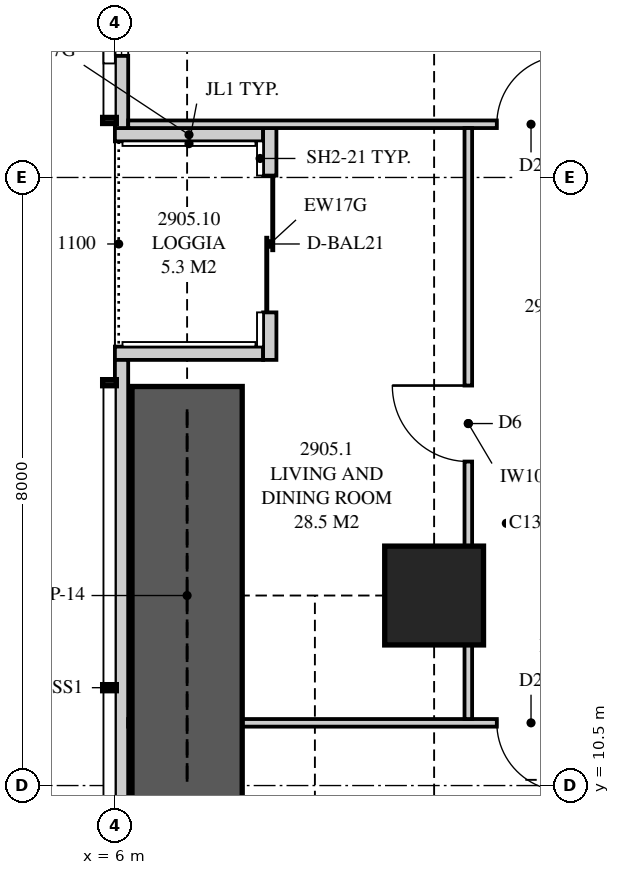
"""IFC4 building model, lengths in metres.
Left out: names, types, materials, properties, quantities, classifications, styles, units other than length and angle.
Written with IfcOpenShell. Run it as: python <this file> out.ifc"""

import sys

from ifc_helpers import new_model, si_unit, direction, frame, frame_2d, origin, origin_2d, place, context, subcontext, project, spatial, polyline, rectangle, outline, extrude, element, fill, save


model = new_model("IFC4")
c1 = context("Model", 3, precision=1e-05, world=origin(), true_north=direction((0.0, 1.0)))
c2 = subcontext(c1, "Body", "Model", "MODEL_VIEW")
j1 = project(units=[si_unit("LENGTHUNIT", "METRE"), si_unit("PLANEANGLEUNIT", "RADIAN")], contexts=[c1])
p1 = place(None, origin())
s1 = spatial("IfcSite", under=j1, at=p1, CompositionType="ELEMENT")
p2 = place(p1, origin())
s2 = spatial("IfcBuilding", under=s1, at=p2, CompositionType="ELEMENT")
p3 = place(p2, frame((0.0, 0.0, 108.2)))
s3 = spatial("IfcBuildingStorey", under=s2, at=p3, CompositionType="ELEMENT", Elevation=108.2)
p4 = place(p3, frame((10.2, 13.0, 0.0), z_axis=(0.0, 0.0, 1.0), x_axis=(1.0, 0.0, 0.0)))
e1 = element("IfcColumn", 1, at=p4, inside=s3, PredefinedType="COLUMN", context=c2, shape_type="SweptSolid", body=[
    extrude(rectangle(XDim=1.3, YDim=1.3, at=origin_2d()), origin(), (0.0, 0.0, 1.0), 3.35),
])
p5 = place(p3, frame((6.087, 34.949, 0.0), z_axis=(0.0, 0.0, 1.0), x_axis=(0.0, -1.0, 0.0)))
e2 = element("IfcWall", 2, at=p5, inside=s3, PredefinedType="SOLIDWALL", context=c2, shape_type="SweptSolid", body=[
    extrude(outline(polyline([(0.0, 0.0), (15.799, 0.0), (15.799, 2.15), (9.949, 2.15), (9.949, 3.11), (9.823, 3.11), (9.823, 2.15), (9.73, 2.15), (9.73, 3.11), (0.0, 3.11), (0.0, 0.0)])), frame((0.0, 0.087, 0.0), z_axis=(0.0, -1.0, 0.0), x_axis=(1.0, 0.0, 0.0)), (0.0, 0.0, 1.0), 0.175),
])
p6 = place(p5, frame((2.724, 0.0, 0.4)))
e3 = element("IfcOpeningElement", 3, at=p6, cuts=e2, PredefinedType="OPENING", context=c2, shape_type="SweptSolid", body=[
    extrude(rectangle(XDim=1.8, YDim=1.7, at=frame_2d((0.9, 0.85))), frame((0.0, 0.097, 0.0), z_axis=(0.0, -1.0, 0.0), x_axis=(1.0, 0.0, 0.0)), (0.0, 0.0, 1.0), 0.195),
])
p7 = place(p5, frame((5.899, 0.0, 0.4)))
e4 = element("IfcOpeningElement", 4, at=p7, cuts=e2, PredefinedType="OPENING", context=c2, shape_type="SweptSolid", body=[
    extrude(rectangle(XDim=1.2, YDim=1.7, at=frame_2d((0.6, 0.85))), frame((0.0, 0.097, 0.0), z_axis=(0.0, -1.0, 0.0), x_axis=(1.0, 0.0, 0.0)), (0.0, 0.0, 1.0), 0.195),
])
p8 = place(p5, frame((13.049, 0.0, 0.4)))
e5 = element("IfcOpeningElement", 5, at=p8, cuts=e2, PredefinedType="OPENING", context=c2, shape_type="SweptSolid", body=[
    extrude(rectangle(XDim=1.8, YDim=1.7, at=frame_2d((0.9, 0.85))), frame((0.0, 0.097, 0.0), z_axis=(0.0, -1.0, 0.0), x_axis=(1.0, 0.0, 0.0)), (0.0, 0.0, 1.0), 0.195),
])
p9 = place(p3, frame((6.087, 16.1, 0.0), z_axis=(0.0, 0.0, 1.0), x_axis=(0.0, -1.0, 0.0)))
e6 = element("IfcWall", 6, at=p9, inside=s3, PredefinedType="SOLIDWALL", context=c2, shape_type="SweptSolid", body=[
    extrude(outline(polyline([(0.0, 0.0), (13.049, 0.0), (13.049, 3.11), (3.319, 3.11), (3.319, 2.15), (3.226, 2.15), (3.226, 3.11), (3.1, 3.11), (3.1, 2.15), (0.0, 2.15), (0.0, 0.0)])), frame((0.0, 0.087, 0.0), z_axis=(0.0, -1.0, 0.0), x_axis=(1.0, 0.0, 0.0)), (0.0, 0.0, 1.0), 0.175),
])
p10 = place(p9, frame((5.975, 0.0, 0.4)))
e7 = element("IfcOpeningElement", 7, at=p10, cuts=e6, PredefinedType="OPENING", context=c2, shape_type="SweptSolid", body=[
    extrude(rectangle(XDim=1.8, YDim=1.7, at=frame_2d((0.9, 0.85))), frame((0.0, 0.097, 0.0), z_axis=(0.0, -1.0, 0.0), x_axis=(1.0, 0.0, 0.0)), (0.0, 0.0, 1.0), 0.195),
])
p11 = place(p9, frame((9.025, 0.0, 0.4)))
e8 = element("IfcOpeningElement", 8, at=p11, cuts=e6, PredefinedType="OPENING", context=c2, shape_type="SweptSolid", body=[
    extrude(rectangle(XDim=1.8, YDim=1.7, at=frame_2d((0.9, 0.85))), frame((0.0, 0.097, 0.0), z_axis=(0.0, -1.0, 0.0), x_axis=(1.0, 0.0, 0.0)), (0.0, 0.0, 1.0), 0.195),
])
p12 = place(p3, frame((8.038, 19.15, 0.0), z_axis=(0.0, 0.0, 1.0), x_axis=(0.0, -1.0, 0.0)))
e9 = element("IfcWall", 9, at=p12, inside=s3, PredefinedType="SOLIDWALL", context=c2, shape_type="SweptSolid", body=[
    extrude(rectangle(XDim=3.05, YDim=0.175, at=frame_2d((1.525, 0.0))), origin(), (0.0, 0.0, 1.0), 3.11),
])
p13 = place(p12, frame((0.625, 0.0, 0.0)))
e10 = element("IfcOpeningElement", 10, at=p13, cuts=e9, PredefinedType="OPENING", context=c2, shape_type="SweptSolid", body=[
    extrude(rectangle(XDim=1.8, YDim=2.1, at=frame_2d((0.9, 1.05))), frame((0.0, 0.097, 0.0), z_axis=(0.0, -1.0, 0.0), x_axis=(1.0, 0.0, 0.0)), (0.0, 0.0, 1.0), 0.195),
])
for number, where, z_axis, x_axis in (
    (11, (6.0, 19.062, 0.0), (0.0, 0.0, 1.0), (1.0, 0.0, 0.0)),
    (12, (6.0, 16.188, 0.0), (0.0, 0.0, 1.0), (1.0, 0.0, 0.0)),
):
    element("IfcWall", number, at=place(p3, frame(where, z_axis=z_axis, x_axis=x_axis)), inside=s3, PredefinedType="SOLIDWALL", context=c2, shape_type="SweptSolid", body=[
        extrude(outline(polyline([(0.0, 0.0), (1.95, 0.0), (1.95, 3.11), (1.75, 3.11), (1.75, 2.15), (0.15, 2.15), (0.15, 3.11), (0.0, 3.11), (0.0, 0.0)])), frame((0.0, 0.087, 0.0), z_axis=(0.0, -1.0, 0.0), x_axis=(1.0, 0.0, 0.0)), (0.0, 0.0, 1.0), 0.175),
    ])
p14 = place(p3, frame((6.175, 11.325, 0.0), z_axis=(0.0, 0.0, 1.0), x_axis=(1.0, 0.0, 0.0)))
e13 = element("IfcWall", 13, at=p14, inside=s3, PredefinedType="PARTITIONING", context=c2, shape_type="SweptSolid", body=[
    extrude(outline(polyline([(0.175, 3.11), (0.0, 3.11), (0.0, 0.0), (0.529, 0.0), (0.529, 0.325), (1.021, 0.325), (1.021, 0.0), (11.4, 0.0), (11.4, 3.11), (5.285, 3.11), (5.285, 2.51), (2.765, 2.51), (2.765, 3.11), (2.744, 3.11), (2.744, 2.541), (2.169, 2.541), (2.169, 3.11), (1.918, 3.11), (1.918, 2.15), (1.021, 2.15), (1.021, 1.825), (0.529, 1.825), (0.529, 2.15), (0.175, 2.15), (0.175, 3.11)])), frame((0.0, 0.05, 0.0), z_axis=(0.0, -1.0, 0.0), x_axis=(1.0, 0.0, 0.0)), (0.0, 0.0, 1.0), 0.1),
])
p15 = place(p14, frame((4.85, 0.0, 0.0)))
e14 = element("IfcOpeningElement", 14, at=p15, cuts=e13, PredefinedType="OPENING", context=c2, shape_type="SweptSolid", body=[
    extrude(rectangle(XDim=0.9, YDim=2.1, at=frame_2d((0.45, 1.05))), frame((0.0, 0.06, 0.0), z_axis=(0.0, -1.0, 0.0), x_axis=(1.0, 0.0, 0.0)), (0.0, 0.0, 1.0), 0.12),
])
p16 = place(p14, frame((6.25, 0.0, 0.0)))
e15 = element("IfcOpeningElement", 15, at=p16, cuts=e13, PredefinedType="OPENING", context=c2, shape_type="SweptSolid", body=[
    extrude(rectangle(XDim=0.9, YDim=2.1, at=frame_2d((0.45, 1.05))), frame((0.0, 0.06, 0.0), z_axis=(0.0, -1.0, 0.0), x_axis=(1.0, 0.0, 0.0)), (0.0, 0.0, 1.0), 0.12),
])
p17 = place(p14, frame((9.7, 0.0, 0.0)))
e16 = element("IfcOpeningElement", 16, at=p17, cuts=e13, PredefinedType="OPENING", context=c2, shape_type="SweptSolid", body=[
    extrude(rectangle(XDim=0.7, YDim=2.1, at=frame_2d((0.35, 1.05))), frame((0.0, 0.06, 0.0), z_axis=(0.0, -1.0, 0.0), x_axis=(1.0, 0.0, 0.0)), (0.0, 0.0, 1.0), 0.12),
])
p18 = place(p3, frame((6.175, 19.2, 0.0), z_axis=(0.0, 0.0, 1.0), x_axis=(1.0, 0.0, 0.0)))
e17 = element("IfcWall", 17, at=p18, inside=s3, PredefinedType="PARTITIONING", context=c2, shape_type="SweptSolid", body=[
    extrude(outline(polyline([(0.0, 0.0), (11.4, 0.0), (11.4, 3.11), (5.285, 3.11), (5.285, 2.51), (2.765, 2.51), (2.765, 3.11), (1.635, 3.11), (1.635, 2.15), (0.0, 2.15), (0.0, 3.11), (0.0, 0.0)])), frame((0.0, 0.05, 0.0), z_axis=(0.0, -1.0, 0.0), x_axis=(1.0, 0.0, 0.0)), (0.0, 0.0, 1.0), 0.1),
])
p19 = place(p18, frame((4.85, 0.0, 0.0)))
e18 = element("IfcOpeningElement", 18, at=p19, cuts=e17, PredefinedType="OPENING", context=c2, shape_type="SweptSolid", body=[
    extrude(rectangle(XDim=0.9, YDim=2.1, at=frame_2d((0.45, 1.05))), frame((0.0, 0.06, 0.0), z_axis=(0.0, -1.0, 0.0), x_axis=(1.0, 0.0, 0.0)), (0.0, 0.0, 1.0), 0.12),
])
p20 = place(p18, frame((9.7, 0.0, 0.0)))
e19 = element("IfcOpeningElement", 19, at=p20, cuts=e17, PredefinedType="OPENING", context=c2, shape_type="SweptSolid", body=[
    extrude(rectangle(XDim=0.7, YDim=2.1, at=frame_2d((0.35, 1.05))), frame((0.0, 0.06, 0.0), z_axis=(0.0, -1.0, 0.0), x_axis=(1.0, 0.0, 0.0)), (0.0, 0.0, 1.0), 0.12),
])
p21 = place(p3, frame((10.65, 11.375, 0.0), z_axis=(0.0, 0.0, 1.0), x_axis=(0.0, 1.0, 0.0)))
e20 = element("IfcWall", 20, at=p21, inside=s3, PredefinedType="PARTITIONING", context=c2, shape_type="SweptSolid", body=[
    extrude(outline(polyline([(0.0, 0.0), (7.775, 0.0), (7.775, 3.11), (7.775, 2.51), (1.685, 2.51), (0.0, 2.51), (0.0, 3.11), (0.0, 0.0)])), frame((0.0, 0.05, 0.0), z_axis=(0.0, -1.0, 0.0), x_axis=(1.0, 0.0, 0.0)), (0.0, 0.0, 1.0), 0.1),
])
p22 = place(p21, frame((3.387, 0.0, 0.0)))
e21 = element("IfcOpeningElement", 21, at=p22, cuts=e20, PredefinedType="OPENING", context=c2, shape_type="SweptSolid", body=[
    extrude(rectangle(XDim=1.0, YDim=2.1, at=frame_2d((0.5, 1.05))), frame((0.0, 0.06, 0.0), z_axis=(0.0, -1.0, 0.0), x_axis=(1.0, 0.0, 0.0)), (0.0, 0.0, 1.0), 0.12),
])
p23 = place(p3, frame((6.95, 10.25, 0.0), z_axis=(0.0, 0.0, 1.0), x_axis=(0.0, 1.0, 0.0)))
e22 = element("IfcWall", 22, at=p23, inside=s3, PredefinedType="SHEAR", context=c2, shape_type="SweptSolid", body=[
    extrude(rectangle(XDim=5.5, YDim=1.45, at=frame_2d((2.75, 0.0))), origin(), (0.0, 0.0, 1.0), 3.35),
])
p24 = place(p8, origin())
e23 = element("IfcWindow", 23, at=p24, inside=s3, PartitioningType="SINGLE_PANEL", PredefinedType="WINDOW", context=c2, shape_type="SweptSolid", body=[
    extrude(rectangle(XDim=1.8, YDim=1.7, at=frame_2d((0.9, 0.85))), frame((0.0, 0.03, 0.0), z_axis=(0.0, -1.0, 0.0), x_axis=(1.0, 0.0, 0.0)), (0.0, 0.0, 1.0), 0.06),
])
fill(e5, e23)
p25 = place(p13, origin())
e24 = element("IfcDoor", 24, at=p25, inside=s3, OperationType="SLIDING_TO_LEFT", PredefinedType="DOOR", context=c2, shape_type="SweptSolid", body=[
    extrude(rectangle(XDim=1.8, YDim=2.1, at=frame_2d((0.9, 1.05))), frame((0.0, 0.025, 0.0), z_axis=(0.0, -1.0, 0.0), x_axis=(1.0, 0.0, 0.0)), (0.0, 0.0, 1.0), 0.05),
])
fill(e10, e24)
p26 = place(p15, frame((0.9, 0.0, 0.0), z_axis=(0.0, 0.0, 1.0), x_axis=(-1.0, 0.0, 0.0)))
e25 = element("IfcDoor", 25, at=p26, inside=s3, OperationType="SINGLE_SWING_LEFT", PredefinedType="DOOR", context=c2, shape_type="SweptSolid", body=[
    extrude(rectangle(XDim=0.9, YDim=2.1, at=frame_2d((0.45, 1.05))), frame((0.0, 0.025, 0.0), z_axis=(0.0, -1.0, 0.0), x_axis=(1.0, 0.0, 0.0)), (0.0, 0.0, 1.0), 0.05),
])
fill(e14, e25)
p27 = place(p19, origin())
e26 = element("IfcDoor", 26, at=p27, inside=s3, OperationType="SINGLE_SWING_RIGHT", PredefinedType="DOOR", context=c2, shape_type="SweptSolid", body=[
    extrude(rectangle(XDim=0.9, YDim=2.1, at=frame_2d((0.45, 1.05))), frame((0.0, 0.025, 0.0), z_axis=(0.0, -1.0, 0.0), x_axis=(1.0, 0.0, 0.0)), (0.0, 0.0, 1.0), 0.05),
])
fill(e18, e26)
p28 = place(p22, origin())
e27 = element("IfcDoor", 27, at=p28, inside=s3, OperationType="SINGLE_SWING_RIGHT", PredefinedType="DOOR", context=c2, shape_type="SweptSolid", body=[
    extrude(rectangle(XDim=1.0, YDim=2.1, at=frame_2d((0.5, 1.05))), frame((0.0, 0.025, 0.0), z_axis=(0.0, -1.0, 0.0), x_axis=(1.0, 0.0, 0.0)), (0.0, 0.0, 1.0), 0.05),
])
fill(e21, e27)
save(model, sys.argv[1])
